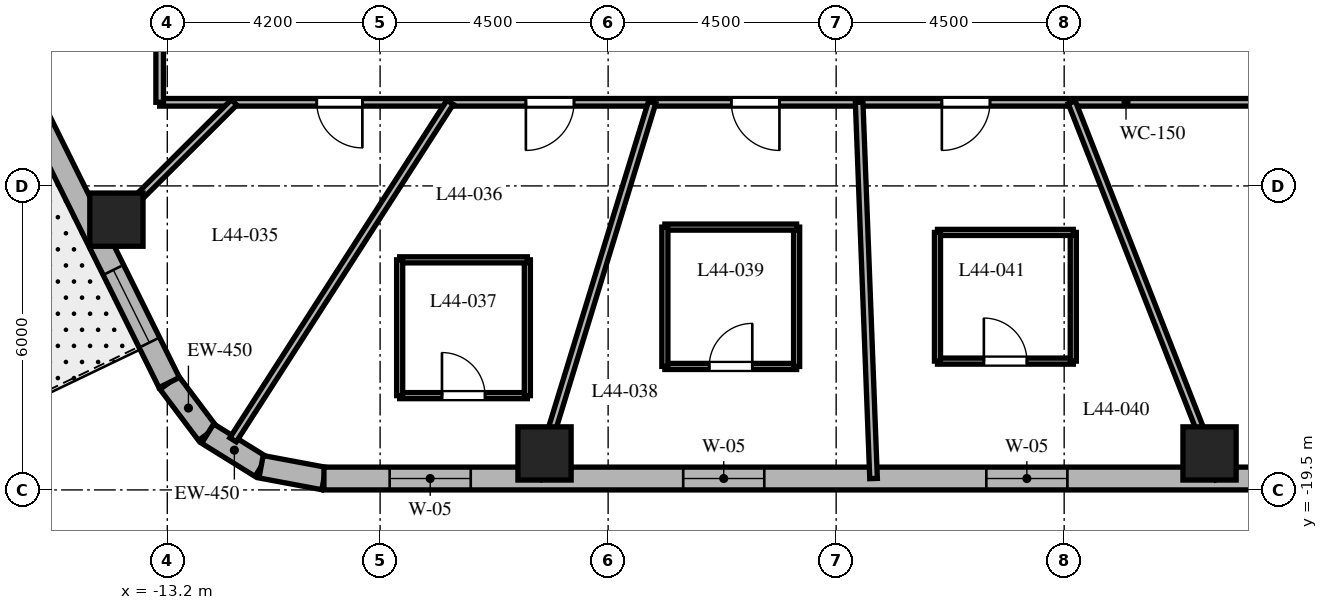
"""IFC4 building model, lengths in metres.
Left out: names, types, materials, properties, quantities, classifications, styles, units other than length and angle.
Written with IfcOpenShell. Run it as: python <this file> out.ifc"""

import sys

from ifc_helpers import new_model, si_unit, direction, frame, frame_2d, origin, origin_2d, place, context, subcontext, project, spatial, rectangle, extrude, element, fill, save


model = new_model("IFC4")
c1 = context("Model", 3, precision=1e-05, world=origin(), true_north=direction((0.0, 1.0)))
c2 = subcontext(c1, "Body", "Model", "MODEL_VIEW")
j1 = project(units=[si_unit("LENGTHUNIT", "METRE"), si_unit("PLANEANGLEUNIT", "RADIAN")], contexts=[c1])
p1 = place(None, origin())
s1 = spatial("IfcSite", under=j1, at=p1, CompositionType="ELEMENT")
p2 = place(p1, origin())
s2 = spatial("IfcBuilding", under=s1, at=p2, CompositionType="ELEMENT")
p3 = place(p2, frame((0.0, 0.0, 179.3)))
s3 = spatial("IfcBuildingStorey", under=s2, at=p3, CompositionType="ELEMENT", Elevation=179.3)
for number, where, z_axis, x_axis in (
    (1, (-5.755, -18.78, 0.0), (0.0, 0.0, 1.0), (1.0, 0.0, 0.0)),
    (2, (7.369, -18.78, 0.0), (0.0, 0.0, 1.0), (1.0, 0.0, 0.0)),
    (3, (-14.204, -14.166, 0.0), (0.0, 0.0, 1.0), (1.0, 0.0, 0.0)),
):
    element("IfcColumn", number, at=place(p3, frame(where, z_axis=z_axis, x_axis=x_axis)), inside=s3, PredefinedType="COLUMN", context=c2, shape_type="SweptSolid", body=[
        extrude(rectangle(XDim=1.05, YDim=1.05, at=origin_2d()), origin(), (0.0, 0.0, 1.0), 3.7),
    ])
p4 = place(p3, frame((-13.162, -17.381, 0.0), z_axis=(0.0, 0.0, 1.0), x_axis=(0.601515770517, -0.798860925205, 0.0)))
e4 = element("IfcWall", 4, at=p4, inside=s3, PredefinedType="SOLIDWALL", context=c2, shape_type="SweptSolid", body=[
    extrude(rectangle(XDim=1.262, YDim=0.45, at=frame_2d((0.631, 0.0))), origin(), (0.0, 0.0, 1.0), 3.4),
])
p5 = place(p3, frame((-12.403, -18.389, 0.0), z_axis=(0.0, 0.0, 1.0), x_axis=(0.849795170926, -0.527113049991, 0.0)))
e5 = element("IfcWall", 5, at=p5, inside=s3, PredefinedType="SOLIDWALL", context=c2, shape_type="SweptSolid", body=[
    extrude(rectangle(XDim=1.241, YDim=0.45, at=frame_2d((0.62, 0.0))), origin(), (0.0, 0.0, 1.0), 3.4),
])
p6 = place(p3, frame((-11.349, -19.043, 0.0), z_axis=(0.0, 0.0, 1.0), x_axis=(0.982931267051, -0.183973161772, 0.0)))
e6 = element("IfcWall", 6, at=p6, inside=s3, PredefinedType="SOLIDWALL", context=c2, shape_type="SweptSolid", body=[
    extrude(rectangle(XDim=1.262, YDim=0.45, at=frame_2d((0.631, 0.0))), origin(), (0.0, 0.0, 1.0), 3.4),
])
p7 = place(p3, frame((-10.108, -19.275, 0.0), z_axis=(0.0, 0.0, 1.0), x_axis=(1.0, 0.0, 0.0)))
e7 = element("IfcWall", 7, at=p7, inside=s3, PredefinedType="SOLIDWALL", context=c2, shape_type="SweptSolid", body=[
    extrude(rectangle(XDim=21.829, YDim=0.45, at=frame_2d((10.915, 0.0))), origin(), (0.0, 0.0, 1.0), 3.4),
])
p8 = place(p7, frame((1.297, 0.0, 0.8)))
e8 = element("IfcOpeningElement", 8, at=p8, cuts=e7, PredefinedType="OPENING", context=c2, shape_type="SweptSolid", body=[
    extrude(rectangle(XDim=1.6, YDim=1.75, at=frame_2d((0.8, 0.875))), frame((0.0, 0.235, 0.0), z_axis=(0.0, -1.0, 0.0), x_axis=(1.0, 0.0, 0.0)), (0.0, 0.0, 1.0), 0.47),
])
p9 = place(p7, frame((7.09, 0.0, 0.8)))
e9 = element("IfcOpeningElement", 9, at=p9, cuts=e7, PredefinedType="OPENING", context=c2, shape_type="SweptSolid", body=[
    extrude(rectangle(XDim=1.6, YDim=1.75, at=frame_2d((0.8, 0.875))), frame((0.0, 0.235, 0.0), z_axis=(0.0, -1.0, 0.0), x_axis=(1.0, 0.0, 0.0)), (0.0, 0.0, 1.0), 0.47),
])
p10 = place(p7, frame((13.072, 0.0, 0.8)))
e10 = element("IfcOpeningElement", 10, at=p10, cuts=e7, PredefinedType="OPENING", context=c2, shape_type="SweptSolid", body=[
    extrude(rectangle(XDim=1.6, YDim=1.75, at=frame_2d((0.8, 0.875))), frame((0.0, 0.235, 0.0), z_axis=(0.0, -1.0, 0.0), x_axis=(1.0, 0.0, 0.0)), (0.0, 0.0, 1.0), 0.47),
])
p11 = place(p7, frame((18.933, 0.0, 0.8)))
e11 = element("IfcOpeningElement", 11, at=p11, cuts=e7, PredefinedType="OPENING", context=c2, shape_type="SweptSolid", body=[
    extrude(rectangle(XDim=1.6, YDim=1.75, at=frame_2d((0.8, 0.875))), frame((0.0, 0.235, 0.0), z_axis=(0.0, -1.0, 0.0), x_axis=(1.0, 0.0, 0.0)), (0.0, 0.0, 1.0), 0.47),
])
p12 = place(p3, frame((-20.618, -2.344, 0.0), z_axis=(0.0, 0.0, 1.0), x_axis=(0.444243691097, -0.895905990002, 0.0)))
e12 = element("IfcWall", 12, at=p12, inside=s3, PredefinedType="SOLIDWALL", context=c2, shape_type="SweptSolid", body=[
    extrude(rectangle(XDim=16.784, YDim=0.45, at=frame_2d((8.392, 0.0))), origin(), (0.0, 0.0, 1.0), 3.4),
])
p13 = place(p12, frame((4.535, 0.0, 0.0)))
e13 = element("IfcOpeningElement", 13, at=p13, cuts=e12, PredefinedType="OPENING", context=c2, shape_type="SweptSolid", body=[
    extrude(rectangle(XDim=0.95, YDim=2.15, at=frame_2d((0.475, 1.075))), frame((0.0, 0.235, 0.0), z_axis=(0.0, -1.0, 0.0), x_axis=(1.0, 0.0, 0.0)), (0.0, 0.0, 1.0), 0.47),
])
p14 = place(p12, frame((0.931, 0.0, 0.8)))
e14 = element("IfcOpeningElement", 14, at=p14, cuts=e12, PredefinedType="OPENING", context=c2, shape_type="SweptSolid", body=[
    extrude(rectangle(XDim=1.6, YDim=1.75, at=frame_2d((0.8, 0.875))), frame((0.0, 0.235, 0.0), z_axis=(0.0, -1.0, 0.0), x_axis=(1.0, 0.0, 0.0)), (0.0, 0.0, 1.0), 0.47),
])
p15 = place(p12, frame((7.642, 0.0, 0.8)))
e15 = element("IfcOpeningElement", 15, at=p15, cuts=e12, PredefinedType="OPENING", context=c2, shape_type="SweptSolid", body=[
    extrude(rectangle(XDim=1.6, YDim=1.75, at=frame_2d((0.8, 0.875))), frame((0.0, 0.235, 0.0), z_axis=(0.0, -1.0, 0.0), x_axis=(1.0, 0.0, 0.0)), (0.0, 0.0, 1.0), 0.47),
])
p16 = place(p12, frame((14.303, 0.0, 0.8)))
e16 = element("IfcOpeningElement", 16, at=p16, cuts=e12, PredefinedType="OPENING", context=c2, shape_type="SweptSolid", body=[
    extrude(rectangle(XDim=1.6, YDim=1.75, at=frame_2d((0.8, 0.875))), frame((0.0, 0.235, 0.0), z_axis=(0.0, -1.0, 0.0), x_axis=(1.0, 0.0, 0.0)), (0.0, 0.0, 1.0), 0.47),
])
p17 = place(p3, frame((13.35, -11.85, 0.0), z_axis=(0.0, 0.0, 1.0), x_axis=(-1.0, 0.0, 0.0)))
e17 = element("IfcWall", 17, at=p17, inside=s3, PredefinedType="PARTITIONING", context=c2, shape_type="SweptSolid", body=[
    extrude(rectangle(XDim=26.7, YDim=0.15, at=frame_2d((13.35, 0.0))), origin(), (0.0, 0.0, 1.0), 2.84),
])
p18 = place(p17, frame((22.7, 0.0, 0.0)))
e18 = element("IfcOpeningElement", 18, at=p18, cuts=e17, PredefinedType="OPENING", context=c2, shape_type="SweptSolid", body=[
    extrude(rectangle(XDim=0.9, YDim=2.03, at=frame_2d((0.45, 1.015))), frame((0.0, 0.085, 0.0), z_axis=(0.0, -1.0, 0.0), x_axis=(1.0, 0.0, 0.0)), (0.0, 0.0, 1.0), 0.17),
])
p19 = place(p17, frame((18.523, 0.0, 0.0)))
e19 = element("IfcOpeningElement", 19, at=p19, cuts=e17, PredefinedType="OPENING", context=c2, shape_type="SweptSolid", body=[
    extrude(rectangle(XDim=0.95, YDim=2.03, at=frame_2d((0.475, 1.015))), frame((0.0, 0.085, 0.0), z_axis=(0.0, -1.0, 0.0), x_axis=(1.0, 0.0, 0.0)), (0.0, 0.0, 1.0), 0.17),
])
p20 = place(p17, frame((14.469, 0.0, 0.0)))
e20 = element("IfcOpeningElement", 20, at=p20, cuts=e17, PredefinedType="OPENING", context=c2, shape_type="SweptSolid", body=[
    extrude(rectangle(XDim=0.95, YDim=2.03, at=frame_2d((0.475, 1.015))), frame((0.0, 0.085, 0.0), z_axis=(0.0, -1.0, 0.0), x_axis=(1.0, 0.0, 0.0)), (0.0, 0.0, 1.0), 0.17),
])
p21 = place(p17, frame((10.314, 0.0, 0.0)))
e21 = element("IfcOpeningElement", 21, at=p21, cuts=e17, PredefinedType="OPENING", context=c2, shape_type="SweptSolid", body=[
    extrude(rectangle(XDim=0.95, YDim=2.03, at=frame_2d((0.475, 1.015))), frame((0.0, 0.085, 0.0), z_axis=(0.0, -1.0, 0.0), x_axis=(1.0, 0.0, 0.0)), (0.0, 0.0, 1.0), 0.17),
])
p22 = place(p17, frame((3.995, 0.0, 0.0)))
e22 = element("IfcOpeningElement", 22, at=p22, cuts=e17, PredefinedType="OPENING", context=c2, shape_type="SweptSolid", body=[
    extrude(rectangle(XDim=0.95, YDim=2.03, at=frame_2d((0.475, 1.015))), frame((0.0, 0.085, 0.0), z_axis=(0.0, -1.0, 0.0), x_axis=(1.0, 0.0, 0.0)), (0.0, 0.0, 1.0), 0.17),
])
p23 = place(p3, frame((-13.35, -11.85, 0.0), z_axis=(0.0, 0.0, 1.0), x_axis=(0.0, 1.0, 0.0)))
e23 = element("IfcWall", 23, at=p23, inside=s3, PredefinedType="PARTITIONING", context=c2, shape_type="SweptSolid", body=[
    extrude(rectangle(XDim=23.7, YDim=0.15, at=frame_2d((11.85, 0.0))), origin(), (0.0, 0.0, 1.0), 2.84),
])
p24 = place(p23, frame((18.389, 0.0, 0.0)))
e24 = element("IfcOpeningElement", 24, at=p24, cuts=e23, PredefinedType="OPENING", context=c2, shape_type="SweptSolid", body=[
    extrude(rectangle(XDim=0.95, YDim=2.03, at=frame_2d((0.475, 1.015))), frame((0.0, 0.085, 0.0), z_axis=(0.0, -1.0, 0.0), x_axis=(1.0, 0.0, 0.0)), (0.0, 0.0, 1.0), 0.17),
])
p25 = place(p23, frame((12.315, 0.0, 0.0)))
e25 = element("IfcOpeningElement", 25, at=p25, cuts=e23, PredefinedType="OPENING", context=c2, shape_type="SweptSolid", body=[
    extrude(rectangle(XDim=0.9, YDim=2.03, at=frame_2d((0.45, 1.015))), frame((0.0, 0.085, 0.0), z_axis=(0.0, -1.0, 0.0), x_axis=(1.0, 0.0, 0.0)), (0.0, 0.0, 1.0), 0.17),
])
p26 = place(p23, frame((9.27, 0.0, 0.0)))
e26 = element("IfcOpeningElement", 26, at=p26, cuts=e23, PredefinedType="OPENING", context=c2, shape_type="SweptSolid", body=[
    extrude(rectangle(XDim=0.9, YDim=2.03, at=frame_2d((0.45, 1.015))), frame((0.0, 0.085, 0.0), z_axis=(0.0, -1.0, 0.0), x_axis=(1.0, 0.0, 0.0)), (0.0, 0.0, 1.0), 0.17),
])
p27 = place(p23, frame((3.765, 0.0, 0.0)))
e27 = element("IfcOpeningElement", 27, at=p27, cuts=e23, PredefinedType="OPENING", context=c2, shape_type="SweptSolid", body=[
    extrude(rectangle(XDim=0.9, YDim=2.03, at=frame_2d((0.45, 1.015))), frame((0.0, 0.085, 0.0), z_axis=(0.0, -1.0, 0.0), x_axis=(1.0, 0.0, 0.0)), (0.0, 0.0, 1.0), 0.17),
])
p28 = place(p3, frame((-11.882, -11.85, 0.0), z_axis=(0.0, 0.0, 1.0), x_axis=(-0.708037373639, -0.706174962407, 0.0)))
e28 = element("IfcWall", 28, at=p28, inside=s3, PredefinedType="PARTITIONING", context=c2, shape_type="SweptSolid", body=[
    extrude(rectangle(XDim=3.802, YDim=0.15, at=frame_2d((1.901, 0.0))), origin(), (0.0, 0.0, 1.0), 2.64),
])
p29 = place(p3, frame((-7.619, -11.85, 0.0), z_axis=(0.0, 0.0, 1.0), x_axis=(-0.540829263478, -0.841132396098, 0.0)))
e29 = element("IfcWall", 29, at=p29, inside=s3, PredefinedType="PARTITIONING", context=c2, shape_type="SweptSolid", body=[
    extrude(rectangle(XDim=7.919, YDim=0.15, at=frame_2d((3.959, 0.0))), origin(), (0.0, 0.0, 1.0), 2.64),
])
p30 = place(p3, frame((-3.631, -11.85, 0.0), z_axis=(0.0, 0.0, 1.0), x_axis=(-0.293007573338, -0.956110120209, 0.0)))
e30 = element("IfcWall", 30, at=p30, inside=s3, PredefinedType="PARTITIONING", context=c2, shape_type="SweptSolid", body=[
    extrude(rectangle(XDim=7.766, YDim=0.15, at=frame_2d((3.883, 0.0))), origin(), (0.0, 0.0, 1.0), 2.64),
])
p31 = place(p3, frame((0.454, -11.85, 0.0), z_axis=(0.0, 0.0, 1.0), x_axis=(0.038279171143, -0.999267083945, 0.0)))
e31 = element("IfcWall", 31, at=p31, inside=s3, PredefinedType="PARTITIONING", context=c2, shape_type="SweptSolid", body=[
    extrude(rectangle(XDim=7.43, YDim=0.15, at=frame_2d((3.715, 0.0))), origin(), (0.0, 0.0, 1.0), 2.64),
])
p32 = place(p3, frame((4.65, -11.85, 0.0), z_axis=(0.0, 0.0, 1.0), x_axis=(0.365265947993, -0.930903210456, 0.0)))
e32 = element("IfcWall", 32, at=p32, inside=s3, PredefinedType="PARTITIONING", context=c2, shape_type="SweptSolid", body=[
    extrude(rectangle(XDim=7.976, YDim=0.15, at=frame_2d((3.988, 0.0))), origin(), (0.0, 0.0, 1.0), 2.64),
])
p33 = place(p3, frame((-8.614, -17.639, 0.0), z_axis=(0.0, 0.0, 1.0), x_axis=(1.0, 0.0, 0.0)))
e33 = element("IfcWall", 33, at=p33, inside=s3, PredefinedType="PARTITIONING", context=c2, shape_type="SweptSolid", body=[
    extrude(rectangle(XDim=2.52, YDim=0.12, at=frame_2d((1.26, 0.0))), origin(), (0.0, 0.0, 1.0), 2.64),
])
p34 = place(p33, frame((0.835, 0.0, 0.0)))
e34 = element("IfcOpeningElement", 34, at=p34, cuts=e33, PredefinedType="OPENING", context=c2, shape_type="SweptSolid", body=[
    extrude(rectangle(XDim=0.85, YDim=2.03, at=frame_2d((0.425, 1.015))), frame((0.0, 0.07, 0.0), z_axis=(0.0, -1.0, 0.0), x_axis=(1.0, 0.0, 0.0)), (0.0, 0.0, 1.0), 0.14),
])
p35 = place(p3, frame((-6.094, -17.639, 0.0), z_axis=(0.0, 0.0, 1.0), x_axis=(0.0, 1.0, 0.0)))
e35 = element("IfcWall", 35, at=p35, inside=s3, PredefinedType="PARTITIONING", context=c2, shape_type="SweptSolid", body=[
    extrude(rectangle(XDim=2.68, YDim=0.12, at=frame_2d((1.34, 0.0))), origin(), (0.0, 0.0, 1.0), 3.4),
])
p36 = place(p3, frame((-6.094, -14.959, 0.0), z_axis=(0.0, 0.0, 1.0), x_axis=(-1.0, 0.0, 0.0)))
e36 = element("IfcWall", 36, at=p36, inside=s3, PredefinedType="PARTITIONING", context=c2, shape_type="SweptSolid", body=[
    extrude(rectangle(XDim=2.52, YDim=0.12, at=frame_2d((1.26, 0.0))), origin(), (0.0, 0.0, 1.0), 3.4),
])
p37 = place(p3, frame((-8.614, -14.959, 0.0), z_axis=(0.0, 0.0, 1.0), x_axis=(0.0, -1.0, 0.0)))
e37 = element("IfcWall", 37, at=p37, inside=s3, PredefinedType="PARTITIONING", context=c2, shape_type="SweptSolid", body=[
    extrude(rectangle(XDim=2.68, YDim=0.12, at=frame_2d((1.34, 0.0))), origin(), (0.0, 0.0, 1.0), 2.64),
])
p38 = place(p3, frame((-3.38, -17.063, 0.0), z_axis=(0.0, 0.0, 1.0), x_axis=(1.0, 0.0, 0.0)))
e38 = element("IfcWall", 38, at=p38, inside=s3, PredefinedType="PARTITIONING", context=c2, shape_type="SweptSolid", body=[
    extrude(rectangle(XDim=2.6, YDim=0.12, at=frame_2d((1.3, 0.0))), origin(), (0.0, 0.0, 1.0), 3.4),
])
p39 = place(p38, frame((0.875, 0.0, 0.0)))
e39 = element("IfcOpeningElement", 39, at=p39, cuts=e38, PredefinedType="OPENING", context=c2, shape_type="SweptSolid", body=[
    extrude(rectangle(XDim=0.85, YDim=2.03, at=frame_2d((0.425, 1.015))), frame((0.0, 0.07, 0.0), z_axis=(0.0, -1.0, 0.0), x_axis=(1.0, 0.0, 0.0)), (0.0, 0.0, 1.0), 0.14),
])
p40 = place(p3, frame((-0.78, -17.063, 0.0), z_axis=(0.0, 0.0, 1.0), x_axis=(0.0, 1.0, 0.0)))
e40 = element("IfcWall", 40, at=p40, inside=s3, PredefinedType="PARTITIONING", context=c2, shape_type="SweptSolid", body=[
    extrude(rectangle(XDim=2.75, YDim=0.12, at=frame_2d((1.375, 0.0))), origin(), (0.0, 0.0, 1.0), 2.84),
])
p41 = place(p3, frame((-0.78, -14.313, 0.0), z_axis=(0.0, 0.0, 1.0), x_axis=(-1.0, 0.0, 0.0)))
e41 = element("IfcWall", 41, at=p41, inside=s3, PredefinedType="PARTITIONING", context=c2, shape_type="SweptSolid", body=[
    extrude(rectangle(XDim=2.6, YDim=0.12, at=frame_2d((1.3, 0.0))), origin(), (0.0, 0.0, 1.0), 3.4),
])
p42 = place(p3, frame((-3.38, -14.313, 0.0), z_axis=(0.0, 0.0, 1.0), x_axis=(0.0, -1.0, 0.0)))
e42 = element("IfcWall", 42, at=p42, inside=s3, PredefinedType="PARTITIONING", context=c2, shape_type="SweptSolid", body=[
    extrude(rectangle(XDim=2.75, YDim=0.12, at=frame_2d((1.375, 0.0))), origin(), (0.0, 0.0, 1.0), 2.84),
])
p43 = place(p3, frame((2.0, -16.958, 0.0), z_axis=(0.0, 0.0, 1.0), x_axis=(1.0, 0.0, 0.0)))
e43 = element("IfcWall", 43, at=p43, inside=s3, PredefinedType="PARTITIONING", context=c2, shape_type="SweptSolid", body=[
    extrude(rectangle(XDim=2.68, YDim=0.12, at=frame_2d((1.34, 0.0))), origin(), (0.0, 0.0, 1.0), 3.4),
])
p44 = place(p43, frame((0.915, 0.0, 0.0)))
e44 = element("IfcOpeningElement", 44, at=p44, cuts=e43, PredefinedType="OPENING", context=c2, shape_type="SweptSolid", body=[
    extrude(rectangle(XDim=0.85, YDim=2.03, at=frame_2d((0.425, 1.015))), frame((0.0, 0.07, 0.0), z_axis=(0.0, -1.0, 0.0), x_axis=(1.0, 0.0, 0.0)), (0.0, 0.0, 1.0), 0.14),
])
p45 = place(p3, frame((4.68, -16.958, 0.0), z_axis=(0.0, 0.0, 1.0), x_axis=(0.0, 1.0, 0.0)))
e45 = element("IfcWall", 45, at=p45, inside=s3, PredefinedType="PARTITIONING", context=c2, shape_type="SweptSolid", body=[
    extrude(rectangle(XDim=2.54, YDim=0.12, at=frame_2d((1.27, 0.0))), origin(), (0.0, 0.0, 1.0), 2.84),
])
p46 = place(p3, frame((4.68, -14.418, 0.0), z_axis=(0.0, 0.0, 1.0), x_axis=(-1.0, 0.0, 0.0)))
e46 = element("IfcWall", 46, at=p46, inside=s3, PredefinedType="PARTITIONING", context=c2, shape_type="SweptSolid", body=[
    extrude(rectangle(XDim=2.68, YDim=0.12, at=frame_2d((1.34, 0.0))), origin(), (0.0, 0.0, 1.0), 3.4),
])
p47 = place(p3, frame((2.0, -14.418, 0.0), z_axis=(0.0, 0.0, 1.0), x_axis=(0.0, -1.0, 0.0)))
e47 = element("IfcWall", 47, at=p47, inside=s3, PredefinedType="PARTITIONING", context=c2, shape_type="SweptSolid", body=[
    extrude(rectangle(XDim=2.54, YDim=0.12, at=frame_2d((1.27, 0.0))), origin(), (0.0, 0.0, 1.0), 2.84),
])
p48 = place(p8, origin())
e48 = element("IfcWindow", 48, at=p48, inside=s3, PartitioningType="SINGLE_PANEL", PredefinedType="WINDOW", context=c2, shape_type="SweptSolid", body=[
    extrude(rectangle(XDim=1.6, YDim=1.75, at=frame_2d((0.8, 0.875))), frame((0.0, 0.03, 0.0), z_axis=(0.0, -1.0, 0.0), x_axis=(1.0, 0.0, 0.0)), (0.0, 0.0, 1.0), 0.06),
])
fill(e8, e48)
p49 = place(p9, origin())
e49 = element("IfcWindow", 49, at=p49, inside=s3, PartitioningType="SINGLE_PANEL", PredefinedType="WINDOW", context=c2, shape_type="SweptSolid", body=[
    extrude(rectangle(XDim=1.6, YDim=1.75, at=frame_2d((0.8, 0.875))), frame((0.0, 0.03, 0.0), z_axis=(0.0, -1.0, 0.0), x_axis=(1.0, 0.0, 0.0)), (0.0, 0.0, 1.0), 0.06),
])
fill(e9, e49)
p50 = place(p10, origin())
e50 = element("IfcWindow", 50, at=p50, inside=s3, PartitioningType="SINGLE_PANEL", PredefinedType="WINDOW", context=c2, shape_type="SweptSolid", body=[
    extrude(rectangle(XDim=1.6, YDim=1.75, at=frame_2d((0.8, 0.875))), frame((0.0, 0.03, 0.0), z_axis=(0.0, -1.0, 0.0), x_axis=(1.0, 0.0, 0.0)), (0.0, 0.0, 1.0), 0.06),
])
fill(e10, e50)
p51 = place(p16, origin())
e51 = element("IfcWindow", 51, at=p51, inside=s3, PartitioningType="SINGLE_PANEL", PredefinedType="WINDOW", context=c2, shape_type="SweptSolid", body=[
    extrude(rectangle(XDim=1.6, YDim=1.75, at=frame_2d((0.8, 0.875))), frame((0.0, 0.03, 0.0), z_axis=(0.0, -1.0, 0.0), x_axis=(1.0, 0.0, 0.0)), (0.0, 0.0, 1.0), 0.06),
])
fill(e16, e51)
p52 = place(p18, origin())
e52 = element("IfcDoor", 52, at=p52, inside=s3, OperationType="SINGLE_SWING_LEFT", PredefinedType="DOOR", context=c2, shape_type="SweptSolid", body=[
    extrude(rectangle(XDim=0.9, YDim=2.03, at=frame_2d((0.45, 1.015))), frame((0.0, 0.025, 0.0), z_axis=(0.0, -1.0, 0.0), x_axis=(1.0, 0.0, 0.0)), (0.0, 0.0, 1.0), 0.05),
])
fill(e18, e52)
p53 = place(p19, origin())
e53 = element("IfcDoor", 53, at=p53, inside=s3, OperationType="SINGLE_SWING_RIGHT", PredefinedType="DOOR", context=c2, shape_type="SweptSolid", body=[
    extrude(rectangle(XDim=0.95, YDim=2.03, at=frame_2d((0.475, 1.015))), frame((0.0, 0.025, 0.0), z_axis=(0.0, -1.0, 0.0), x_axis=(1.0, 0.0, 0.0)), (0.0, 0.0, 1.0), 0.05),
])
fill(e19, e53)
p54 = place(p34, origin())
e54 = element("IfcDoor", 54, at=p54, inside=s3, OperationType="SINGLE_SWING_LEFT", PredefinedType="DOOR", context=c2, shape_type="SweptSolid", body=[
    extrude(rectangle(XDim=0.85, YDim=2.03, at=frame_2d((0.425, 1.015))), frame((0.0, 0.025, 0.0), z_axis=(0.0, -1.0, 0.0), x_axis=(1.0, 0.0, 0.0)), (0.0, 0.0, 1.0), 0.05),
])
fill(e34, e54)
p55 = place(p20, origin())
e55 = element("IfcDoor", 55, at=p55, inside=s3, OperationType="SINGLE_SWING_LEFT", PredefinedType="DOOR", context=c2, shape_type="SweptSolid", body=[
    extrude(rectangle(XDim=0.95, YDim=2.03, at=frame_2d((0.475, 1.015))), frame((0.0, 0.025, 0.0), z_axis=(0.0, -1.0, 0.0), x_axis=(1.0, 0.0, 0.0)), (0.0, 0.0, 1.0), 0.05),
])
fill(e20, e55)
p56 = place(p39, origin())
e56 = element("IfcDoor", 56, at=p56, inside=s3, OperationType="SINGLE_SWING_RIGHT", PredefinedType="DOOR", context=c2, shape_type="SweptSolid", body=[
    extrude(rectangle(XDim=0.85, YDim=2.03, at=frame_2d((0.425, 1.015))), frame((0.0, 0.025, 0.0), z_axis=(0.0, -1.0, 0.0), x_axis=(1.0, 0.0, 0.0)), (0.0, 0.0, 1.0), 0.05),
])
fill(e39, e56)
p57 = place(p21, origin())
e57 = element("IfcDoor", 57, at=p57, inside=s3, OperationType="SINGLE_SWING_RIGHT", PredefinedType="DOOR", context=c2, shape_type="SweptSolid", body=[
    extrude(rectangle(XDim=0.95, YDim=2.03, at=frame_2d((0.475, 1.015))), frame((0.0, 0.025, 0.0), z_axis=(0.0, -1.0, 0.0), x_axis=(1.0, 0.0, 0.0)), (0.0, 0.0, 1.0), 0.05),
])
fill(e21, e57)
p58 = place(p44, origin())
e58 = element("IfcDoor", 58, at=p58, inside=s3, OperationType="SINGLE_SWING_LEFT", PredefinedType="DOOR", context=c2, shape_type="SweptSolid", body=[
    extrude(rectangle(XDim=0.85, YDim=2.03, at=frame_2d((0.425, 1.015))), frame((0.0, 0.025, 0.0), z_axis=(0.0, -1.0, 0.0), x_axis=(1.0, 0.0, 0.0)), (0.0, 0.0, 1.0), 0.05),
])
fill(e44, e58)
save(model, sys.argv[1])
